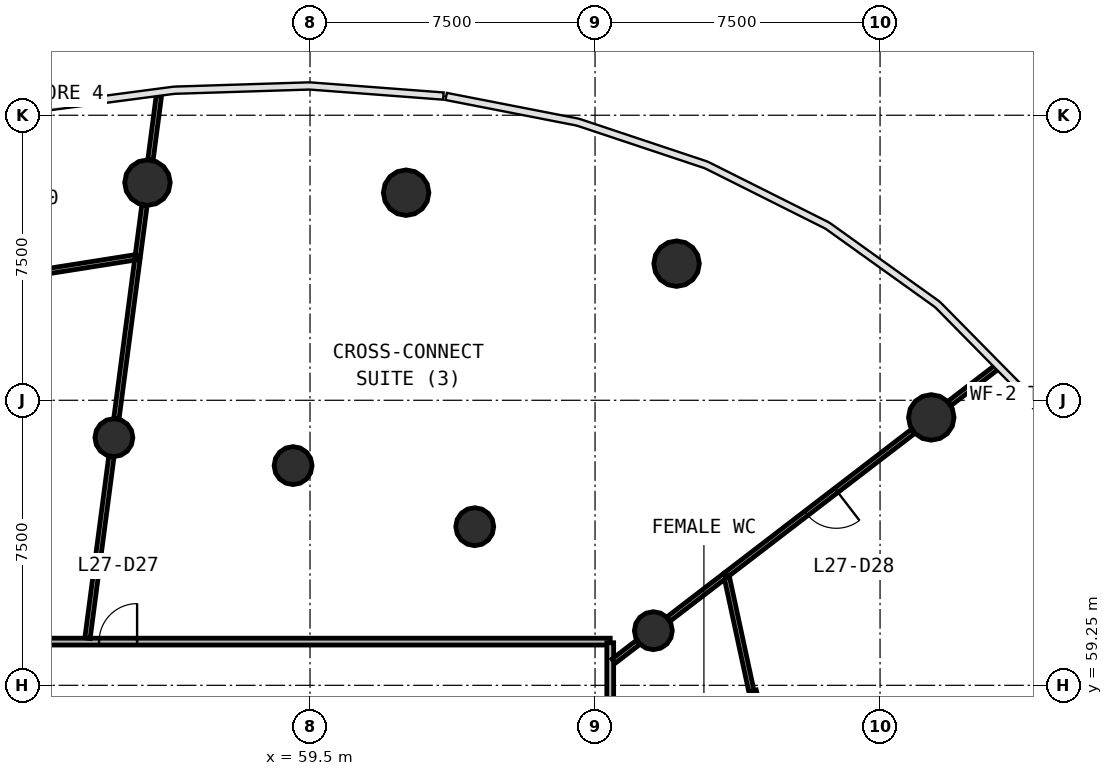
"""IFC4 building model, lengths in metres.
Left out: names, types, materials, properties, quantities, classifications, styles, units other than length and angle.
Written with IfcOpenShell. Run it as: python <this file> out.ifc"""

import sys

from ifc_helpers import new_model, si_unit, direction, frame, frame_2d, origin, origin_2d, place, context, subcontext, project, spatial, rectangle, circle, extrude, source, transform, mapped, element, fill, save


model = new_model("IFC4")
c1 = context("Model", 3, precision=1e-05, world=origin(), true_north=direction((0.0, 1.0)))
c2 = subcontext(c1, "Body", "Model", "MODEL_VIEW")
j1 = project(units=[si_unit("LENGTHUNIT", "METRE"), si_unit("PLANEANGLEUNIT", "RADIAN")], contexts=[c1])
p1 = place(None, origin())
s1 = spatial("IfcSite", under=j1, at=p1, CompositionType="ELEMENT")
p2 = place(p1, origin())
s2 = spatial("IfcBuilding", under=s1, at=p2, CompositionType="ELEMENT")
p3 = place(p2, frame((0.0, 0.0, 116.7)))
s3 = spatial("IfcBuildingStorey", under=s2, at=p3, CompositionType="ELEMENT", Elevation=116.7)
m1 = source(origin(), c2, "Body", "SweptSolid", [
    extrude(circle(Radius=0.6, at=origin_2d()), origin(), (0.0, 0.0, 1.0), 4.1),
])
for number, where, z_axis, x_axis in (
    (1, (75.848, 66.299, 0.0), (0.0, 0.0, 1.0), (1.0, 0.0, 0.0)),
    (2, (69.146, 70.345, 0.0), (0.0, 0.0, 1.0), (1.0, 0.0, 0.0)),
    (3, (62.029, 72.212, 0.0), (0.0, 0.0, 1.0), (1.0, 0.0, 0.0)),
    (4, (55.222, 72.477, 0.0), (0.0, 0.0, 1.0), (1.0, 0.0, 0.0)),
):
    element("IfcColumn", number, at=place(p3, frame(where, z_axis=z_axis, x_axis=x_axis)), inside=s3, PredefinedType="COLUMN", context=c2, shape_type="MappedRepresentation", body=[
        mapped(m1, transform((0.0, 0.0, 0.0), scale=1.0)),
    ])
m2 = source(origin(), c2, "Body", "SweptSolid", [
    extrude(circle(Radius=0.5, at=origin_2d()), origin(), (0.0, 0.0, 1.0), 4.1),
])
for number, where, z_axis, x_axis in (
    (5, (68.535, 60.688, 0.0), (0.0, 0.0, 1.0), (1.0, 0.0, 0.0)),
    (6, (63.835, 63.424, 0.0), (0.0, 0.0, 1.0), (1.0, 0.0, 0.0)),
    (7, (59.055, 65.031, 0.0), (0.0, 0.0, 1.0), (1.0, 0.0, 0.0)),
    (8, (54.339, 65.767, 0.0), (0.0, 0.0, 1.0), (1.0, 0.0, 0.0)),
):
    element("IfcColumn", number, at=place(p3, frame(where, z_axis=z_axis, x_axis=x_axis)), inside=s3, PredefinedType="COLUMN", context=c2, shape_type="MappedRepresentation", body=[
        mapped(m2, transform((0.0, 0.0, 0.0), scale=1.0)),
    ])
p4 = place(p3, frame((36.6, 60.4, 0.0), z_axis=(0.0, 0.0, 1.0), x_axis=(1.0, 0.0, 0.0)))
e9 = element("IfcWall", 9, at=p4, inside=s3, PredefinedType="PARTITIONING", context=c2, shape_type="SweptSolid", body=[
    extrude(rectangle(XDim=30.8, YDim=0.18, at=frame_2d((15.4, 0.0))), origin(), (0.0, 0.0, 1.0), 2.9),
])
p5 = place(p4, frame((17.35, 0.0, 0.0)))
e10 = element("IfcOpeningElement", 10, at=p5, cuts=e9, PredefinedType="OPENING", context=c2, shape_type="SweptSolid", body=[
    extrude(rectangle(XDim=1.0, YDim=2.1, at=frame_2d((0.5, 1.05))), frame((0.0, 0.1, 0.0), z_axis=(0.0, -1.0, 0.0), x_axis=(1.0, 0.0, 0.0)), (0.0, 0.0, 1.0), 0.2),
])
p6 = place(p4, frame((14.95, 0.0, 0.0)))
e11 = element("IfcOpeningElement", 11, at=p6, cuts=e9, PredefinedType="OPENING", context=c2, shape_type="SweptSolid", body=[
    extrude(rectangle(XDim=1.0, YDim=2.1, at=frame_2d((0.5, 1.05))), frame((0.0, 0.1, 0.0), z_axis=(0.0, -1.0, 0.0), x_axis=(1.0, 0.0, 0.0)), (0.0, 0.0, 1.0), 0.2),
])
p7 = place(p4, frame((8.95, 0.0, 0.0)))
e12 = element("IfcOpeningElement", 12, at=p7, cuts=e9, PredefinedType="OPENING", context=c2, shape_type="SweptSolid", body=[
    extrude(rectangle(XDim=1.0, YDim=2.1, at=frame_2d((0.5, 1.05))), frame((0.0, 0.1, 0.0), z_axis=(0.0, -1.0, 0.0), x_axis=(1.0, 0.0, 0.0)), (0.0, 0.0, 1.0), 0.2),
])
p8 = place(p3, frame((67.4, 60.37, 0.0), z_axis=(0.0, 0.0, 1.0), x_axis=(0.0, -1.0, 0.0)))
e13 = element("IfcWall", 13, at=p8, inside=s3, PredefinedType="PARTITIONING", context=c2, shape_type="SweptSolid", body=[
    extrude(rectangle(XDim=23.583, YDim=0.18, at=frame_2d((11.791, 0.0))), origin(), (0.0, 0.0, 1.0), 2.9),
])
p9 = place(p8, frame((9.232, 0.0, 0.0)))
e14 = element("IfcOpeningElement", 14, at=p9, cuts=e13, PredefinedType="OPENING", context=c2, shape_type="SweptSolid", body=[
    extrude(rectangle(XDim=0.9, YDim=2.1, at=frame_2d((0.45, 1.05))), frame((0.0, 0.1, 0.0), z_axis=(0.0, -1.0, 0.0), x_axis=(1.0, 0.0, 0.0)), (0.0, 0.0, 1.0), 0.2),
])
p10 = place(p8, frame((6.232, 0.0, 0.0)))
e15 = element("IfcOpeningElement", 15, at=p10, cuts=e13, PredefinedType="OPENING", context=c2, shape_type="SweptSolid", body=[
    extrude(rectangle(XDim=0.9, YDim=2.1, at=frame_2d((0.45, 1.05))), frame((0.0, 0.1, 0.0), z_axis=(0.0, -1.0, 0.0), x_axis=(1.0, 0.0, 0.0)), (0.0, 0.0, 1.0), 0.2),
])
p11 = place(p8, frame((3.032, 0.0, 0.0)))
e16 = element("IfcOpeningElement", 16, at=p11, cuts=e13, PredefinedType="OPENING", context=c2, shape_type="SweptSolid", body=[
    extrude(rectangle(XDim=0.9, YDim=2.1, at=frame_2d((0.45, 1.05))), frame((0.0, 0.1, 0.0), z_axis=(0.0, -1.0, 0.0), x_axis=(1.0, 0.0, 0.0)), (0.0, 0.0, 1.0), 0.2),
])
p12 = place(p8, frame((14.732, 0.0, 0.0)))
e17 = element("IfcOpeningElement", 17, at=p12, cuts=e13, PredefinedType="OPENING", context=c2, shape_type="SweptSolid", body=[
    extrude(rectangle(XDim=1.0, YDim=2.1, at=frame_2d((0.5, 1.05))), frame((0.0, 0.1, 0.0), z_axis=(0.0, -1.0, 0.0), x_axis=(1.0, 0.0, 0.0)), (0.0, 0.0, 1.0), 0.2),
])
p13 = place(p8, frame((11.333, 0.0, 0.0)))
e18 = element("IfcOpeningElement", 18, at=p13, cuts=e13, PredefinedType="OPENING", context=c2, shape_type="SweptSolid", body=[
    extrude(rectangle(XDim=1.0, YDim=2.1, at=frame_2d((0.5, 1.05))), frame((0.0, 0.1, 0.0), z_axis=(0.0, -1.0, 0.0), x_axis=(1.0, 0.0, 0.0)), (0.0, 0.0, 1.0), 0.2),
])
p14 = place(p3, frame((75.369, 65.931, 0.0), z_axis=(0.0, 0.0, 1.0), x_axis=(-0.793364649737, -0.608746689969, 0.0)))
e19 = element("IfcWall", 19, at=p14, inside=s3, PredefinedType="PARTITIONING", context=c2, shape_type="SweptSolid", body=[
    extrude(rectangle(XDim=6.196, YDim=0.14, at=frame_2d((3.098, 0.0))), origin(), (0.0, 0.0, 1.0), 2.9),
])
p15 = place(p14, frame((2.545, 0.0, 0.0)))
e20 = element("IfcOpeningElement", 20, at=p15, cuts=e19, PredefinedType="OPENING", context=c2, shape_type="SweptSolid", body=[
    extrude(rectangle(XDim=1.0, YDim=2.1, at=frame_2d((0.5, 1.05))), frame((0.0, 0.08, 0.0), z_axis=(0.0, -1.0, 0.0), x_axis=(1.0, 0.0, 0.0)), (0.0, 0.0, 1.0), 0.16),
])
p16 = place(p3, frame((71.745, 56.178, 0.0), z_axis=(0.0, 0.0, 1.0), x_axis=(-0.211012899324, 0.977483276746, 0.0)))
e21 = element("IfcWall", 21, at=p16, inside=s3, PredefinedType="PARTITIONING", context=c2, shape_type="SweptSolid", body=[
    extrude(rectangle(XDim=6.089, YDim=0.14, at=frame_2d((3.045, 0.0))), origin(), (0.0, 0.0, 1.0), 2.9),
])
p17 = place(p3, frame((49.156, 69.603, 0.0), z_axis=(0.0, 0.0, 1.0), x_axis=(0.987742424173, 0.156092611898, 0.0)))
e22 = element("IfcWall", 22, at=p17, inside=s3, PredefinedType="PARTITIONING", context=c2, shape_type="SweptSolid", body=[
    extrude(rectangle(XDim=5.881, YDim=0.14, at=frame_2d((2.94, 0.0))), origin(), (0.0, 0.0, 1.0), 2.9),
])
p18 = place(p17, frame((2.431, 0.0, 0.0)))
e23 = element("IfcOpeningElement", 23, at=p18, cuts=e22, PredefinedType="OPENING", context=c2, shape_type="SweptSolid", body=[
    extrude(rectangle(XDim=1.0, YDim=2.1, at=frame_2d((0.5, 1.05))), frame((0.0, 0.08, 0.0), z_axis=(0.0, -1.0, 0.0), x_axis=(1.0, 0.0, 0.0)), (0.0, 0.0, 1.0), 0.16),
])
p19 = place(p3, frame((53.644, 60.49, 0.0), z_axis=(0.0, 0.0, 1.0), x_axis=(0.130523979823, 0.991445152639, 0.0)))
e24 = element("IfcWall", 24, at=p19, inside=s3, PredefinedType="PARTITIONING", context=c2, shape_type="SweptSolid", body=[
    extrude(rectangle(XDim=4.818, YDim=0.14, at=frame_2d((2.409, 0.0))), origin(), (0.0, 0.0, 1.0), 2.9),
])
p20 = place(p3, frame((54.405, 66.267, 0.0), z_axis=(0.0, 0.0, 1.0), x_axis=(0.130494948199, 0.991448974226, 0.0)))
e25 = element("IfcWall", 25, at=p20, inside=s3, PredefinedType="PARTITIONING", context=c2, shape_type="SweptSolid", body=[
    extrude(rectangle(XDim=4.217, YDim=0.14, at=frame_2d((2.108, 0.0))), origin(), (0.0, 0.0, 1.0), 2.9),
])
p21 = place(p3, frame((68.935, 60.995, 0.0), z_axis=(0.0, 0.0, 1.0), x_axis=(0.793326792115, 0.608796025703, 0.0)))
e26 = element("IfcWall", 26, at=p21, inside=s3, PredefinedType="PARTITIONING", context=c2, shape_type="SweptSolid", body=[
    extrude(rectangle(XDim=1.884, YDim=0.14, at=frame_2d((0.942, 0.0))), origin(), (0.0, 0.0, 1.0), 2.9),
])
p22 = place(p3, frame((55.301, 73.076, 0.0), z_axis=(0.0, 0.0, 1.0), x_axis=(0.130536236518, 0.991443538965, 0.0)))
e27 = element("IfcWall", 27, at=p22, inside=s3, PredefinedType="PARTITIONING", context=c2, shape_type="SweptSolid", body=[
    extrude(rectangle(XDim=1.7, YDim=0.14, at=frame_2d((0.85, 0.0))), origin(), (0.0, 0.0, 1.0), 2.9),
])
p23 = place(p3, frame((76.328, 66.667, 0.0), z_axis=(0.0, 0.0, 1.0), x_axis=(0.793354548889, 0.60875985393, 0.0)))
e28 = element("IfcWall", 28, at=p23, inside=s3, PredefinedType="PARTITIONING", context=c2, shape_type="SweptSolid", body=[
    extrude(rectangle(XDim=1.576, YDim=0.14, at=frame_2d((0.788, 0.0))), origin(), (0.0, 0.0, 1.0), 2.9),
])
p24 = place(p3, frame((54.969, 70.55, 0.0), z_axis=(0.0, 0.0, 1.0), x_axis=(0.130563003548, 0.991440014375, 0.0)))
e29 = element("IfcWall", 29, at=p24, inside=s3, PredefinedType="PARTITIONING", context=c2, shape_type="SweptSolid", body=[
    extrude(rectangle(XDim=1.339, YDim=0.14, at=frame_2d((0.669, 0.0))), origin(), (0.0, 0.0, 1.0), 2.9),
])
p25 = place(p3, frame((67.49, 59.886, 0.0), z_axis=(0.0, 0.0, 1.0), x_axis=(0.793316076519, 0.608809989025, 0.0)))
e30 = element("IfcWall", 30, at=p25, inside=s3, PredefinedType="PARTITIONING", context=c2, shape_type="SweptSolid", body=[
    extrude(rectangle(XDim=0.812, YDim=0.14, at=frame_2d((0.406, 0.0))), origin(), (0.0, 0.0, 1.0), 2.9),
])
p26 = place(p3, frame((71.423, 58.111, 0.0), z_axis=(0.0, 0.0, 1.0), x_axis=(-0.232763298867, 0.972533416753, 0.0)))
e31 = element("IfcWall", 31, at=p26, inside=s3, PredefinedType="PARTITIONING", context=c2, shape_type="SweptSolid", body=[
    extrude(rectangle(XDim=1.03, YDim=0.12, at=frame_2d((0.515, 0.0))), origin(), (0.0, 0.0, 1.0), 2.9),
])
m3 = source(origin(), c2, "Body", "SweptSolid", [
    extrude(rectangle(XDim=1.0, YDim=2.1, at=frame_2d((0.5, 1.05))), frame((0.0, 0.025, 0.0), z_axis=(0.0, -1.0, 0.0), x_axis=(1.0, 0.0, 0.0)), (0.0, 0.0, 1.0), 0.05),
])
p27 = place(p5, origin())
e32 = element("IfcDoor", 32, at=p27, inside=s3, OperationType="SINGLE_SWING_RIGHT", PredefinedType="DOOR", context=c2, shape_type="MappedRepresentation", body=[
    mapped(m3, transform((0.0, 0.0, 0.0), scale=1.0)),
])
fill(e10, e32)
p28 = place(p15, origin())
e33 = element("IfcDoor", 33, at=p28, inside=s3, OperationType="SINGLE_SWING_LEFT", PredefinedType="DOOR", context=c2, shape_type="MappedRepresentation", body=[
    mapped(m3, transform((0.0, 0.0, 0.0), scale=1.0)),
])
fill(e20, e33)
save(model, sys.argv[1])
